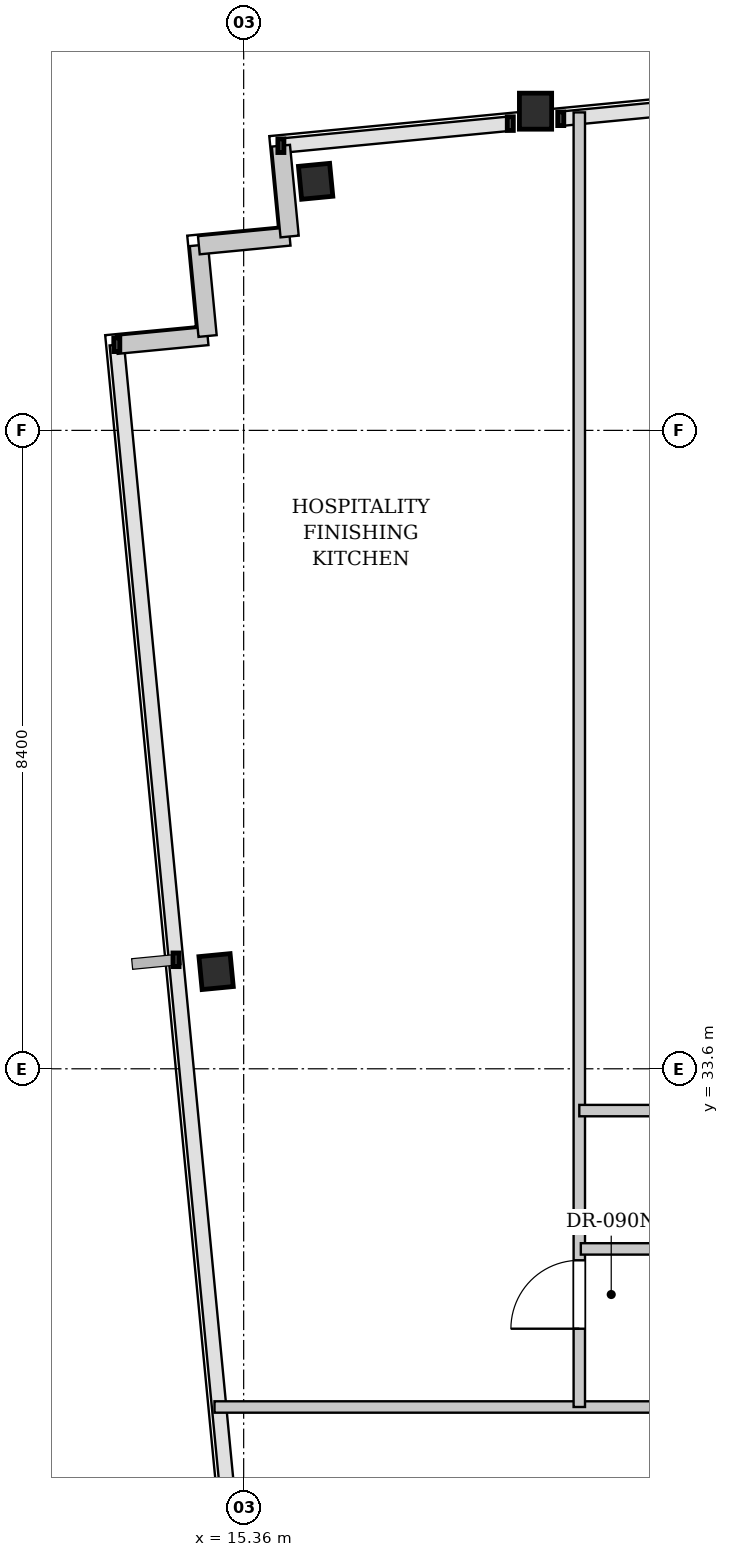
"""IFC4 building model, lengths in metres.
Left out: names, types, materials, properties, quantities, classifications, styles, units other than length and angle.
Written with IfcOpenShell. Run it as: python <this file> out.ifc"""

import sys

from ifc_helpers import new_model, si_unit, direction, frame, frame_2d, origin, origin_2d, place, context, subcontext, project, spatial, rectangle, i_section, extrude, element, fill, save


model = new_model("IFC4")
c1 = context("Model", 3, precision=1e-05, world=origin(), true_north=direction((0.0, 1.0)))
c2 = subcontext(c1, "Body", "Model", "MODEL_VIEW")
j1 = project(units=[si_unit("LENGTHUNIT", "METRE"), si_unit("PLANEANGLEUNIT", "RADIAN")], contexts=[c1])
p1 = place(None, origin())
s1 = spatial("IfcSite", under=j1, at=p1, CompositionType="ELEMENT")
p2 = place(p1, origin())
s2 = spatial("IfcBuilding", under=s1, at=p2, CompositionType="ELEMENT")
p3 = place(p2, frame((0.0, 0.0, 113.5)))
s3 = spatial("IfcBuildingStorey", under=s2, at=p3, CompositionType="ELEMENT", Elevation=113.5)
p4 = place(p3, frame((19.2, 46.2, 0.0), z_axis=(0.0, 0.0, 1.0), x_axis=(1.0, 0.0, 0.0)))
e1 = element("IfcColumn", 1, at=p4, inside=s3, PredefinedType="COLUMN", context=c2, shape_type="SweptSolid", body=[
    extrude(i_section(OverallWidth=0.424, OverallDepth=0.474, WebThickness=0.047, FlangeThickness=0.077, FilletRadius=0.015, at=origin_2d()), origin(), (0.0, 0.0, 1.0), 3.4),
])
for number, where, z_axis, x_axis in (
    (2, (16.307, 45.277, 0.0), (0.0, 0.0, 1.0), (0.995, 0.096, 0.0)),
    (3, (14.997, 34.879, 0.0), (0.0, 0.0, 1.0), (0.995, 0.096, 0.0)),
):
    element("IfcColumn", number, at=place(p3, frame(where, z_axis=z_axis, x_axis=x_axis)), inside=s3, PredefinedType="COLUMN", context=c2, shape_type="SweptSolid", body=[
        extrude(i_section(OverallWidth=0.412, OverallDepth=0.435, WebThickness=0.036, FlangeThickness=0.058, FilletRadius=0.015, at=origin_2d()), origin(), (0.0, 0.0, 1.0), 3.4),
    ])
for number, where, z_axis, x_axis in (
    (4, (13.691, 43.127, 0.0), (0.0, 0.0, 1.0), (0.995, 0.096, 0.0)),
    (5, (14.885, 43.242, 0.0), (0.0, 0.0, 1.0), (-0.096, 0.995, 0.0)),
):
    element("IfcWall", number, at=place(p3, frame(where, z_axis=z_axis, x_axis=x_axis)), inside=s3, PredefinedType="SOLIDWALL", context=c2, shape_type="SweptSolid", body=[
        extrude(rectangle(XDim=1.2, YDim=0.24, at=frame_2d((0.6, 0.0))), origin(), (0.0, 0.0, 1.0), 3.18),
    ])
for number, where, z_axis, x_axis in (
    (6, (14.771, 44.436, 0.0), (0.0, 0.0, 1.0), (0.995, 0.096, 0.0)),
    (7, (15.965, 44.551, 0.0), (0.0, 0.0, 1.0), (-0.096, 0.995, 0.0)),
):
    element("IfcWall", number, at=place(p3, frame(where, z_axis=z_axis, x_axis=x_axis)), inside=s3, PredefinedType="SOLIDWALL", context=c2, shape_type="SweptSolid", body=[
        extrude(rectangle(XDim=1.2, YDim=0.24, at=frame_2d((0.6, 0.0))), origin(), (0.0, 0.0, 1.0), 3.18),
    ])
p5 = place(p3, frame((14.976, 29.15, 0.0), z_axis=(0.0, 0.0, 1.0), x_axis=(1.0, 0.0, 0.0)))
e8 = element("IfcWall", 8, at=p5, inside=s3, PredefinedType="PARTITIONING", context=c2, shape_type="SweptSolid", body=[
    extrude(rectangle(XDim=61.222, YDim=0.15, at=frame_2d((30.611, 0.0))), origin(), (0.0, 0.0, 1.0), 2.525),
])
p6 = place(p5, frame((10.012, 0.0, 0.0)))
e9 = element("IfcOpeningElement", 9, at=p6, cuts=e8, PredefinedType="OPENING", context=c2, shape_type="SweptSolid", body=[
    extrude(rectangle(XDim=1.0, YDim=2.15, at=frame_2d((0.5, 1.075))), frame((0.0, 0.085, 0.0), z_axis=(0.0, -1.0, 0.0), x_axis=(1.0, 0.0, 0.0)), (0.0, 0.0, 1.0), 0.17),
])
p7 = place(p5, frame((23.954, 0.0, 0.0)))
e10 = element("IfcOpeningElement", 10, at=p7, cuts=e8, PredefinedType="OPENING", context=c2, shape_type="SweptSolid", body=[
    extrude(rectangle(XDim=1.0, YDim=2.15, at=frame_2d((0.5, 1.075))), frame((0.0, 0.085, 0.0), z_axis=(0.0, -1.0, 0.0), x_axis=(1.0, 0.0, 0.0)), (0.0, 0.0, 1.0), 0.17),
])
p8 = place(p5, frame((37.442, 0.0, 0.0)))
e11 = element("IfcOpeningElement", 11, at=p8, cuts=e8, PredefinedType="OPENING", context=c2, shape_type="SweptSolid", body=[
    extrude(rectangle(XDim=1.0, YDim=2.15, at=frame_2d((0.5, 1.075))), frame((0.0, 0.085, 0.0), z_axis=(0.0, -1.0, 0.0), x_axis=(1.0, 0.0, 0.0)), (0.0, 0.0, 1.0), 0.17),
])
p9 = place(p5, frame((48.311, 0.0, 0.0)))
e12 = element("IfcOpeningElement", 12, at=p9, cuts=e8, PredefinedType="OPENING", context=c2, shape_type="SweptSolid", body=[
    extrude(rectangle(XDim=1.0, YDim=2.15, at=frame_2d((0.5, 1.075))), frame((0.0, 0.085, 0.0), z_axis=(0.0, -1.0, 0.0), x_axis=(1.0, 0.0, 0.0)), (0.0, 0.0, 1.0), 0.17),
])
p10 = place(p3, frame((19.776, 29.15, 0.0), z_axis=(0.0, 0.0, 1.0), x_axis=(0.0, 1.0, 0.0)))
e13 = element("IfcWall", 13, at=p10, inside=s3, PredefinedType="PARTITIONING", context=c2, shape_type="SweptSolid", body=[
    extrude(rectangle(XDim=17.034, YDim=0.15, at=frame_2d((8.517, 0.0))), origin(), (0.0, 0.0, 1.0), 3.18),
])
p11 = place(p10, frame((1.03, 0.0, 0.0)))
e14 = element("IfcOpeningElement", 14, at=p11, cuts=e13, PredefinedType="OPENING", context=c2, shape_type="SweptSolid", body=[
    extrude(rectangle(XDim=0.9, YDim=2.15, at=frame_2d((0.45, 1.075))), frame((0.0, 0.085, 0.0), z_axis=(0.0, -1.0, 0.0), x_axis=(1.0, 0.0, 0.0)), (0.0, 0.0, 1.0), 0.17),
])
p12 = place(p3, frame((19.776, 33.05, 0.0), z_axis=(0.0, 0.0, 1.0), x_axis=(1.0, 0.0, 0.0)))
e15 = element("IfcWall", 15, at=p12, inside=s3, PredefinedType="PARTITIONING", context=c2, shape_type="SweptSolid", body=[
    extrude(rectangle(XDim=8.724, YDim=0.15, at=frame_2d((4.362, 0.0))), origin(), (0.0, 0.0, 1.0), 3.18),
])
p13 = place(p3, frame((19.796, 31.23, 0.0), z_axis=(0.0, 0.0, 1.0), x_axis=(1.0, 0.0, 0.0)))
e16 = element("IfcWall", 16, at=p13, inside=s3, PredefinedType="PARTITIONING", context=c2, shape_type="SweptSolid", body=[
    extrude(rectangle(XDim=8.694, YDim=0.15, at=frame_2d((4.347, 0.0))), origin(), (0.0, 0.0, 1.0), 3.18),
])
p14 = place(p13, frame((3.897, 0.0, 0.0)))
e17 = element("IfcOpeningElement", 17, at=p14, cuts=e16, PredefinedType="OPENING", context=c2, shape_type="SweptSolid", body=[
    extrude(rectangle(XDim=0.9, YDim=2.15, at=frame_2d((0.45, 1.075))), frame((0.0, 0.085, 0.0), z_axis=(0.0, -1.0, 0.0), x_axis=(1.0, 0.0, 0.0)), (0.0, 0.0, 1.0), 0.17),
])
p15 = place(p11, origin())
e18 = element("IfcDoor", 18, at=p15, inside=s3, OperationType="SINGLE_SWING_LEFT", PredefinedType="DOOR", context=c2, shape_type="SweptSolid", body=[
    extrude(rectangle(XDim=0.9, YDim=2.15, at=frame_2d((0.45, 1.075))), frame((0.0, 0.025, 0.0), z_axis=(0.0, -1.0, 0.0), x_axis=(1.0, 0.0, 0.0)), (0.0, 0.0, 1.0), 0.05),
])
fill(e14, e18)
save(model, sys.argv[1])
